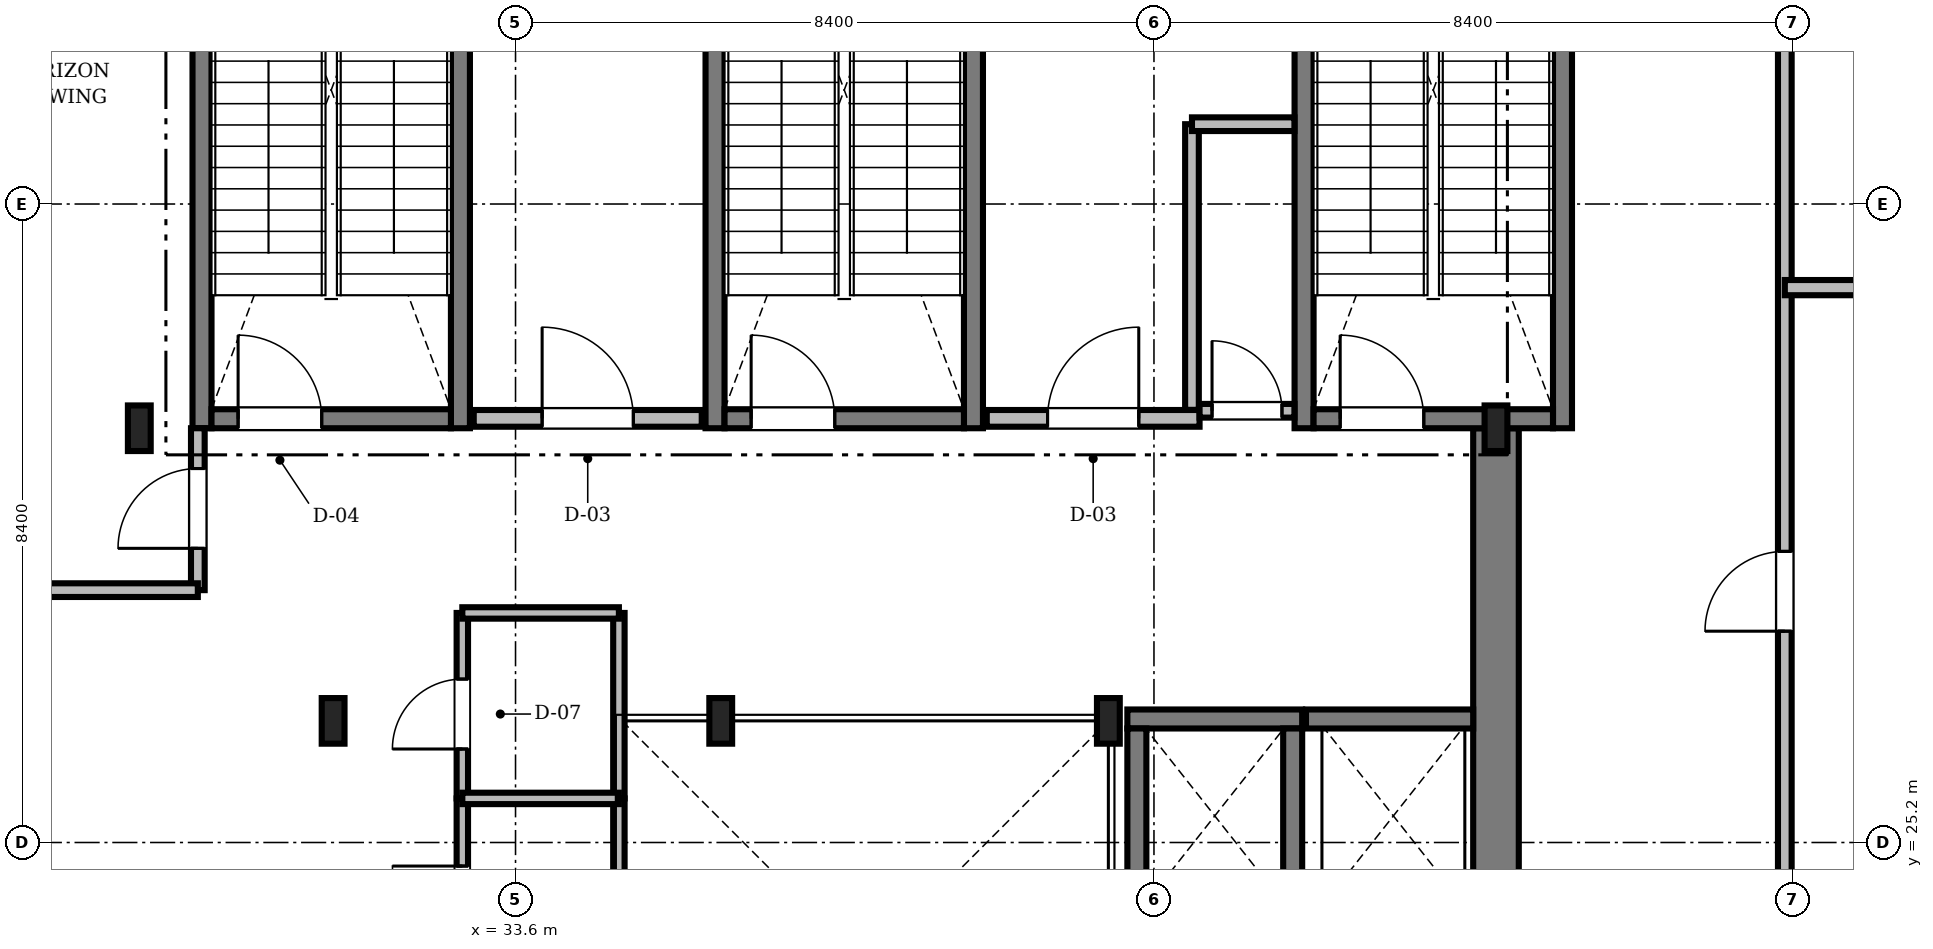
"""IFC4 building model, lengths in metres.
Left out: names, types, materials, properties, quantities, classifications, styles, units other than length and angle.
Written with IfcOpenShell. Run it as: python <this file> out.ifc"""

import sys

from ifc_helpers import new_model, si_unit, direction, frame, frame_2d, origin, origin_2d, place, context, subcontext, project, spatial, rectangle, i_section, extrude, source, transform, mapped, element, fill, save


model = new_model("IFC4")
c1 = context("Model", 3, precision=1e-05, world=origin(), true_north=direction((0.0, 1.0)))
c2 = subcontext(c1, "Body", "Model", "MODEL_VIEW")
j1 = project(units=[si_unit("LENGTHUNIT", "METRE"), si_unit("PLANEANGLEUNIT", "RADIAN")], contexts=[c1])
p1 = place(None, origin())
s1 = spatial("IfcSite", under=j1, at=p1, CompositionType="ELEMENT")
p2 = place(p1, origin())
s2 = spatial("IfcBuilding", under=s1, at=p2, CompositionType="ELEMENT")
p3 = place(p2, frame((0.0, 0.0, 296.15)))
s3 = spatial("IfcBuildingStorey", under=s2, at=p3, CompositionType="ELEMENT", Elevation=296.15)
m1 = source(origin(), c2, "Body", "SweptSolid", [
    extrude(rectangle(XDim=13.15, YDim=0.6, at=frame_2d((6.575, 0.0))), origin(), (0.0, 0.0, 1.0), 4.7),
])
p4 = place(p3, frame((46.5, 17.5, 0.0), z_axis=(0.0, 0.0, 1.0), x_axis=(0.0, 1.0, 0.0)))
e1 = element("IfcWall", 1, at=p4, inside=s3, PredefinedType="SHEAR", context=c2, shape_type="MappedRepresentation", body=[
    mapped(m1, transform((0.0, 0.0, 0.0), scale=1.0)),
])
m2 = source(origin(), c2, "Body", "SweptSolid", [
    extrude(i_section(OverallWidth=0.3, OverallDepth=0.6, WebThickness=0.015, FlangeThickness=0.03, FilletRadius=0.027, at=origin_2d()), origin(), (0.0, 0.0, 1.0), 4.7),
])
for number, where, z_axis, x_axis in (
    (2, (41.4, 26.8, 0.0), (0.0, 0.0, 1.0), (1.0, 0.0, 0.0)),
    (3, (36.3, 26.8, 0.0), (0.0, 0.0, 1.0), (1.0, 0.0, 0.0)),
    (4, (31.2, 26.8, 0.0), (0.0, 0.0, 1.0), (1.0, 0.0, 0.0)),
    (5, (28.65, 30.65, 0.0), (0.0, 0.0, 1.0), (1.0, 0.0, 0.0)),
    (6, (46.5, 30.65, 0.0), (0.0, 0.0, 1.0), (1.0, 0.0, 0.0)),
):
    element("IfcColumn", number, at=place(p3, frame(where, z_axis=z_axis, x_axis=x_axis)), inside=s3, PredefinedType="COLUMN", context=c2, shape_type="MappedRepresentation", body=[
        mapped(m2, transform((0.0, 0.0, 0.0), scale=1.0)),
    ])
m3 = source(origin(), c2, "Body", "SweptSolid", [
    extrude(rectangle(XDim=1.2, YDim=1.2, at=origin_2d()), origin(), (0.0, 0.0, 1.0), 4.738),
])
p5 = place(p3, frame((26.65, 33.732, 0.0), z_axis=(0.113979310359, -0.054052575301, 0.992011610775), x_axis=(0.428490156126, 0.903546449333, 0.0)))
e7 = element("IfcColumn", 7, at=p5, inside=s3, PredefinedType="COLUMN", context=c2, shape_type="MappedRepresentation", body=[
    mapped(m3, transform((0.0, 0.0, 0.0), scale=1.0)),
])
m4 = source(origin(), c2, "Body", "SweptSolid", [
    extrude(rectangle(XDim=9.35, YDim=0.25, at=frame_2d((4.675, 0.0))), origin(), (0.0, 0.0, 1.0), 4.8),
])
for number, where, z_axis, x_axis in (
    (8, (29.475, 30.65, 0.0), (0.0, 0.0, 1.0), (0.0, 1.0, 0.0)),
    (9, (32.875, 30.65, 0.0), (0.0, 0.0, 1.0), (0.0, 1.0, 0.0)),
):
    element("IfcWall", number, at=place(p3, frame(where, z_axis=z_axis, x_axis=x_axis)), inside=s3, PredefinedType="SOLIDWALL", context=c2, shape_type="MappedRepresentation", body=[
        mapped(m4, transform((0.0, 0.0, 0.0), scale=1.0)),
    ])
m5 = source(origin(), c2, "Body", "SweptSolid", [
    extrude(rectangle(XDim=3.15, YDim=0.25, at=frame_2d((1.575, 0.0))), origin(), (0.0, 0.0, 1.0), 4.8),
])
p6 = place(p3, frame((29.6, 30.775, 0.0), z_axis=(0.0, 0.0, 1.0), x_axis=(1.0, 0.0, 0.0)))
e10 = element("IfcWall", 10, at=p6, inside=s3, PredefinedType="SOLIDWALL", context=c2, shape_type="MappedRepresentation", body=[
    mapped(m5, transform((0.0, 0.0, 0.0), scale=1.0)),
])
m6 = source(origin(), c2, "Body", "SweptSolid", [
    extrude(rectangle(XDim=1.1, YDim=2.2, at=frame_2d((0.55, 1.1))), frame((0.0, 0.135, 0.0), z_axis=(0.0, -1.0, 0.0), x_axis=(1.0, 0.0, 0.0)), (0.0, 0.0, 1.0), 0.27),
])
p7 = place(p6, frame((0.35, 0.0, 0.0)))
e11 = element("IfcOpeningElement", 11, at=p7, cuts=e10, PredefinedType="OPENING", context=c2, shape_type="MappedRepresentation", body=[
    mapped(m6, transform((0.0, 0.0, 0.0), scale=1.0)),
])
for number, where, z_axis, x_axis in (
    (12, (36.225, 30.65, 0.0), (0.0, 0.0, 1.0), (0.0, 1.0, 0.0)),
    (13, (39.625, 30.65, 0.0), (0.0, 0.0, 1.0), (0.0, 1.0, 0.0)),
):
    element("IfcWall", number, at=place(p3, frame(where, z_axis=z_axis, x_axis=x_axis)), inside=s3, PredefinedType="SOLIDWALL", context=c2, shape_type="MappedRepresentation", body=[
        mapped(m4, transform((0.0, 0.0, 0.0), scale=1.0)),
    ])
p8 = place(p3, frame((36.35, 30.775, 0.0), z_axis=(0.0, 0.0, 1.0), x_axis=(1.0, 0.0, 0.0)))
e14 = element("IfcWall", 14, at=p8, inside=s3, PredefinedType="SOLIDWALL", context=c2, shape_type="MappedRepresentation", body=[
    mapped(m5, transform((0.0, 0.0, 0.0), scale=1.0)),
])
p9 = place(p8, frame((0.35, 0.0, 0.0)))
e15 = element("IfcOpeningElement", 15, at=p9, cuts=e14, PredefinedType="OPENING", context=c2, shape_type="MappedRepresentation", body=[
    mapped(m6, transform((0.0, 0.0, 0.0), scale=1.0)),
])
for number, where, z_axis, x_axis in (
    (16, (43.975, 30.65, 0.0), (0.0, 0.0, 1.0), (0.0, 1.0, 0.0)),
    (17, (47.375, 30.65, 0.0), (0.0, 0.0, 1.0), (0.0, 1.0, 0.0)),
):
    element("IfcWall", number, at=place(p3, frame(where, z_axis=z_axis, x_axis=x_axis)), inside=s3, PredefinedType="SOLIDWALL", context=c2, shape_type="MappedRepresentation", body=[
        mapped(m4, transform((0.0, 0.0, 0.0), scale=1.0)),
    ])
p10 = place(p3, frame((44.1, 30.775, 0.0), z_axis=(0.0, 0.0, 1.0), x_axis=(1.0, 0.0, 0.0)))
e18 = element("IfcWall", 18, at=p10, inside=s3, PredefinedType="SOLIDWALL", context=c2, shape_type="MappedRepresentation", body=[
    mapped(m5, transform((0.0, 0.0, 0.0), scale=1.0)),
])
p11 = place(p10, frame((0.35, 0.0, 0.0)))
e19 = element("IfcOpeningElement", 19, at=p11, cuts=e18, PredefinedType="OPENING", context=c2, shape_type="MappedRepresentation", body=[
    mapped(m6, transform((0.0, 0.0, 0.0), scale=1.0)),
])
m7 = source(origin(), c2, "Body", "SweptSolid", [
    extrude(rectangle(XDim=3.0, YDim=0.22, at=frame_2d((1.5, 0.0))), origin(), (0.0, 0.0, 1.0), 4.7),
])
p12 = place(p3, frame((33.05, 30.78, 0.0), z_axis=(0.0, 0.0, 1.0), x_axis=(1.0, 0.0, 0.0)))
e20 = element("IfcWall", 20, at=p12, inside=s3, PredefinedType="SOLIDWALL", context=c2, shape_type="MappedRepresentation", body=[
    mapped(m7, transform((0.0, 0.0, 0.0), scale=1.0)),
])
m8 = source(origin(), c2, "Body", "SweptSolid", [
    extrude(rectangle(XDim=1.2, YDim=2.2, at=frame_2d((0.6, 1.1))), frame((0.0, 0.12, 0.0), z_axis=(0.0, -1.0, 0.0), x_axis=(1.0, 0.0, 0.0)), (0.0, 0.0, 1.0), 0.24),
])
p13 = place(p12, frame((0.9, 0.0, 0.0)))
e21 = element("IfcOpeningElement", 21, at=p13, cuts=e20, PredefinedType="OPENING", context=c2, shape_type="MappedRepresentation", body=[
    mapped(m8, transform((0.0, 0.0, 0.0), scale=1.0)),
])
m9 = source(origin(), c2, "Body", "SweptSolid", [
    extrude(rectangle(XDim=2.8, YDim=0.22, at=frame_2d((1.4, 0.0))), origin(), (0.0, 0.0, 1.0), 4.7),
])
p14 = place(p3, frame((39.8, 30.78, 0.0), z_axis=(0.0, 0.0, 1.0), x_axis=(1.0, 0.0, 0.0)))
e22 = element("IfcWall", 22, at=p14, inside=s3, PredefinedType="SOLIDWALL", context=c2, shape_type="MappedRepresentation", body=[
    mapped(m9, transform((0.0, 0.0, 0.0), scale=1.0)),
])
p15 = place(p14, frame((0.8, 0.0, 0.0)))
e23 = element("IfcOpeningElement", 23, at=p15, cuts=e22, PredefinedType="OPENING", context=c2, shape_type="MappedRepresentation", body=[
    mapped(m8, transform((0.0, 0.0, 0.0), scale=1.0)),
])
m10 = source(origin(), c2, "Body", "SweptSolid", [
    extrude(rectangle(XDim=2.3, YDim=0.25, at=frame_2d((1.15, 0.0))), origin(), (0.0, 0.0, 1.0), 4.7),
])
for number, where, z_axis, x_axis in (
    (24, (41.65, 26.825, 0.0), (0.0, 0.0, 1.0), (1.0, 0.0, 0.0)),
    (25, (41.775, 24.4, 0.0), (0.0, 0.0, 1.0), (0.0, 1.0, 0.0)),
    (26, (43.825, 24.4, 0.0), (0.0, 0.0, 1.0), (0.0, 1.0, 0.0)),
):
    element("IfcWall", number, at=place(p3, frame(where, z_axis=z_axis, x_axis=x_axis)), inside=s3, PredefinedType="SOLIDWALL", context=c2, shape_type="MappedRepresentation", body=[
        mapped(m10, transform((0.0, 0.0, 0.0), scale=1.0)),
    ])
m11 = source(origin(), c2, "Body", "SweptSolid", [
    extrude(rectangle(XDim=2.2, YDim=0.25, at=frame_2d((1.1, 0.0))), origin(), (0.0, 0.0, 1.0), 4.7),
])
p16 = place(p3, frame((44.0, 26.825, 0.0), z_axis=(0.0, 0.0, 1.0), x_axis=(1.0, 0.0, 0.0)))
e27 = element("IfcWall", 27, at=p16, inside=s3, PredefinedType="SOLIDWALL", context=c2, shape_type="MappedRepresentation", body=[
    mapped(m11, transform((0.0, 0.0, 0.0), scale=1.0)),
])
m12 = source(origin(), c2, "Body", "SweptSolid", [
    extrude(rectangle(XDim=26.428, YDim=0.18, at=frame_2d((13.214, 0.0))), origin(), (0.0, 0.0, 1.0), 3.942),
])
p17 = place(p3, frame((50.3, 16.45, 0.0), z_axis=(0.0, 0.0, 1.0), x_axis=(0.0, 1.0, 0.0)))
e28 = element("IfcWall", 28, at=p17, inside=s3, PredefinedType="PARTITIONING", context=c2, shape_type="MappedRepresentation", body=[
    mapped(m12, transform((0.0, 0.0, 0.0), scale=1.0)),
])
m13 = source(origin(), c2, "Body", "SweptSolid", [
    extrude(rectangle(XDim=1.05, YDim=2.2, at=frame_2d((0.525, 1.1))), frame((0.0, 0.1, 0.0), z_axis=(0.0, -1.0, 0.0), x_axis=(1.0, 0.0, 0.0)), (0.0, 0.0, 1.0), 0.2),
])
p18 = place(p17, frame((3.53, 0.0, 0.0)))
e29 = element("IfcOpeningElement", 29, at=p18, cuts=e28, PredefinedType="OPENING", context=c2, shape_type="MappedRepresentation", body=[
    mapped(m13, transform((0.0, 0.0, 0.0), scale=1.0)),
])
p19 = place(p17, frame((11.53, 0.0, 0.0)))
e30 = element("IfcOpeningElement", 30, at=p19, cuts=e28, PredefinedType="OPENING", context=c2, shape_type="MappedRepresentation", body=[
    mapped(m13, transform((0.0, 0.0, 0.0), scale=1.0)),
])
p20 = place(p17, frame((20.705, 0.0, 0.0)))
e31 = element("IfcOpeningElement", 31, at=p20, cuts=e28, PredefinedType="OPENING", context=c2, shape_type="MappedRepresentation", body=[
    mapped(m13, transform((0.0, 0.0, 0.0), scale=1.0)),
])
m14 = source(origin(), c2, "Body", "SweptSolid", [
    extrude(rectangle(XDim=2.13, YDim=0.18, at=frame_2d((1.065, 0.0))), origin(), (0.0, 0.0, 1.0), 4.332),
])
p21 = place(p3, frame((29.42, 28.52, 0.0), z_axis=(0.0, 0.0, 1.0), x_axis=(0.0, 1.0, 0.0)))
e32 = element("IfcWall", 32, at=p21, inside=s3, PredefinedType="PARTITIONING", context=c2, shape_type="MappedRepresentation", body=[
    mapped(m14, transform((0.0, 0.0, 0.0), scale=1.0)),
])
p22 = place(p21, frame((0.55, 0.0, 0.0)))
e33 = element("IfcOpeningElement", 33, at=p22, cuts=e32, PredefinedType="OPENING", context=c2, shape_type="MappedRepresentation", body=[
    mapped(m13, transform((0.0, 0.0, 0.0), scale=1.0)),
])
m15 = source(origin(), c2, "Body", "SweptSolid", [
    extrude(rectangle(XDim=2.46, YDim=0.15, at=frame_2d((1.23, 0.0))), origin(), (0.0, 0.0, 1.0), 4.7),
])
p23 = place(p3, frame((32.9, 23.32, 0.0), z_axis=(0.0, 0.0, 1.0), x_axis=(0.0, 1.0, 0.0)))
e34 = element("IfcWall", 34, at=p23, inside=s3, PredefinedType="PARTITIONING", context=c2, shape_type="MappedRepresentation", body=[
    mapped(m15, transform((0.0, 0.0, 0.0), scale=1.0)),
])
m16 = source(origin(), c2, "Body", "SweptSolid", [
    extrude(rectangle(XDim=0.92, YDim=2.1, at=frame_2d((0.46, 1.05))), frame((0.0, 0.085, 0.0), z_axis=(0.0, -1.0, 0.0), x_axis=(1.0, 0.0, 0.0)), (0.0, 0.0, 1.0), 0.17),
])
p24 = place(p23, frame((0.65, 0.0, 0.0)))
e35 = element("IfcOpeningElement", 35, at=p24, cuts=e34, PredefinedType="OPENING", context=c2, shape_type="MappedRepresentation", body=[
    mapped(m16, transform((0.0, 0.0, 0.0), scale=1.0)),
])
m17 = source(origin(), c2, "Body", "SweptSolid", [
    extrude(rectangle(XDim=2.44, YDim=0.15, at=frame_2d((1.22, 0.0))), origin(), (0.0, 0.0, 1.0), 4.242),
])
p25 = place(p3, frame((32.9, 25.78, 0.0), z_axis=(0.0, 0.0, 1.0), x_axis=(0.0, 1.0, 0.0)))
e36 = element("IfcWall", 36, at=p25, inside=s3, PredefinedType="PARTITIONING", context=c2, shape_type="MappedRepresentation", body=[
    mapped(m17, transform((0.0, 0.0, 0.0), scale=1.0)),
])
p26 = place(p25, frame((0.65, 0.0, 0.0)))
e37 = element("IfcOpeningElement", 37, at=p26, cuts=e36, PredefinedType="OPENING", context=c2, shape_type="MappedRepresentation", body=[
    mapped(m16, transform((0.0, 0.0, 0.0), scale=1.0)),
])
m18 = source(origin(), c2, "Body", "SweptSolid", [
    extrude(rectangle(XDim=1.248, YDim=0.18, at=frame_2d((0.624, 0.0))), origin(), (0.0, 0.0, 1.0), 4.7),
])
p27 = place(p3, frame((42.6, 30.88, 0.0), z_axis=(0.0, 0.0, 1.0), x_axis=(1.0, 0.0, 0.0)))
e38 = element("IfcWall", 38, at=p27, inside=s3, PredefinedType="PARTITIONING", context=c2, shape_type="MappedRepresentation", body=[
    mapped(m18, transform((0.0, 0.0, 0.0), scale=1.0)),
])
m19 = source(origin(), c2, "Body", "SweptSolid", [
    extrude(rectangle(XDim=0.92, YDim=2.1, at=frame_2d((0.46, 1.05))), frame((0.0, 0.1, 0.0), z_axis=(0.0, -1.0, 0.0), x_axis=(1.0, 0.0, 0.0)), (0.0, 0.0, 1.0), 0.2),
])
p28 = place(p27, frame((0.164, 0.0, 0.0)))
e39 = element("IfcOpeningElement", 39, at=p28, cuts=e38, PredefinedType="OPENING", context=c2, shape_type="MappedRepresentation", body=[
    mapped(m19, transform((0.0, 0.0, 0.0), scale=1.0)),
])
m20 = source(origin(), c2, "Body", "SweptSolid", [
    extrude(rectangle(XDim=10.878, YDim=0.2, at=frame_2d((5.439, 0.0))), origin(), (0.0, 0.0, 1.0), 3.942),
])
p29 = place(p3, frame((50.3, 32.5, 0.0), z_axis=(0.0, 0.0, 1.0), x_axis=(1.0, 0.0, 0.0)))
e40 = element("IfcWall", 40, at=p29, inside=s3, PredefinedType="PARTITIONING", context=c2, shape_type="MappedRepresentation", body=[
    mapped(m20, transform((0.0, 0.0, 0.0), scale=1.0)),
])
m21 = source(origin(), c2, "Body", "SweptSolid", [
    extrude(rectangle(XDim=3.758, YDim=0.18, at=frame_2d((1.879, 0.0))), origin(), (0.0, 0.0, 1.0), 4.7),
])
p30 = place(p3, frame((42.5, 30.892, 0.0), z_axis=(0.0, 0.0, 1.0), x_axis=(0.0, 1.0, 0.0)))
e41 = element("IfcWall", 41, at=p30, inside=s3, PredefinedType="PARTITIONING", context=c2, shape_type="MappedRepresentation", body=[
    mapped(m21, transform((0.0, 0.0, 0.0), scale=1.0)),
])
m22 = source(origin(), c2, "Body", "SweptSolid", [
    extrude(rectangle(XDim=3.598, YDim=0.18, at=frame_2d((1.799, 0.0))), origin(), (0.0, 0.0, 1.0), 3.942),
])
p31 = place(p3, frame((25.822, 28.52, 0.0), z_axis=(0.0, 0.0, 1.0), x_axis=(1.0, 0.0, 0.0)))
e42 = element("IfcWall", 42, at=p31, inside=s3, PredefinedType="PARTITIONING", context=c2, shape_type="MappedRepresentation", body=[
    mapped(m22, transform((0.0, 0.0, 0.0), scale=1.0)),
])
p32 = place(p3, frame((34.96, 23.32, 0.0), z_axis=(0.0, 0.0, 1.0), x_axis=(0.0, 1.0, 0.0)))
e43 = element("IfcWall", 43, at=p32, inside=s3, PredefinedType="PARTITIONING", context=c2, shape_type="MappedRepresentation", body=[
    mapped(m15, transform((0.0, 0.0, 0.0), scale=1.0)),
])
p33 = place(p3, frame((34.96, 25.78, 0.0), z_axis=(0.0, 0.0, 1.0), x_axis=(0.0, 1.0, 0.0)))
e44 = element("IfcWall", 44, at=p33, inside=s3, PredefinedType="PARTITIONING", context=c2, shape_type="MappedRepresentation", body=[
    mapped(m17, transform((0.0, 0.0, 0.0), scale=1.0)),
])
m23 = source(origin(), c2, "Body", "SweptSolid", [
    extrude(rectangle(XDim=2.06, YDim=0.15, at=frame_2d((1.03, 0.0))), origin(), (0.0, 0.0, 1.0), 4.7),
])
p34 = place(p3, frame((32.9, 25.78, 0.0), z_axis=(0.0, 0.0, 1.0), x_axis=(1.0, 0.0, 0.0)))
e45 = element("IfcWall", 45, at=p34, inside=s3, PredefinedType="PARTITIONING", context=c2, shape_type="MappedRepresentation", body=[
    mapped(m23, transform((0.0, 0.0, 0.0), scale=1.0)),
])
m24 = source(origin(), c2, "Body", "SweptSolid", [
    extrude(rectangle(XDim=2.06, YDim=0.15, at=frame_2d((1.03, 0.0))), origin(), (0.0, 0.0, 1.0), 4.332),
])
p35 = place(p3, frame((32.9, 28.22, 0.0), z_axis=(0.0, 0.0, 1.0), x_axis=(1.0, 0.0, 0.0)))
e46 = element("IfcWall", 46, at=p35, inside=s3, PredefinedType="PARTITIONING", context=c2, shape_type="MappedRepresentation", body=[
    mapped(m24, transform((0.0, 0.0, 0.0), scale=1.0)),
])
m25 = source(origin(), c2, "Body", "SweptSolid", [
    extrude(rectangle(XDim=1.348, YDim=0.18, at=frame_2d((0.674, 0.0))), origin(), (0.0, 0.0, 1.0), 4.7),
])
p36 = place(p3, frame((42.5, 34.65, 0.0), z_axis=(0.0, 0.0, 1.0), x_axis=(1.0, 0.0, 0.0)))
e47 = element("IfcWall", 47, at=p36, inside=s3, PredefinedType="PARTITIONING", context=c2, shape_type="MappedRepresentation", body=[
    mapped(m25, transform((0.0, 0.0, 0.0), scale=1.0)),
])
m26 = source(origin(), c2, "Body", "SweptSolid", [
    extrude(rectangle(XDim=1.1, YDim=2.2, at=frame_2d((0.55, 1.1))), frame((0.0, 0.025, 0.0), z_axis=(0.0, -1.0, 0.0), x_axis=(1.0, 0.0, 0.0)), (0.0, 0.0, 1.0), 0.05),
])
p37 = place(p7, origin())
e48 = element("IfcDoor", 48, at=p37, inside=s3, OperationType="SINGLE_SWING_LEFT", PredefinedType="DOOR", context=c2, shape_type="MappedRepresentation", body=[
    mapped(m26, transform((0.0, 0.0, 0.0), scale=1.0)),
])
fill(e11, e48)
p38 = place(p9, origin())
e49 = element("IfcDoor", 49, at=p38, inside=s3, OperationType="SINGLE_SWING_LEFT", PredefinedType="DOOR", context=c2, shape_type="MappedRepresentation", body=[
    mapped(m26, transform((0.0, 0.0, 0.0), scale=1.0)),
])
fill(e15, e49)
p39 = place(p11, origin())
e50 = element("IfcDoor", 50, at=p39, inside=s3, OperationType="SINGLE_SWING_LEFT", PredefinedType="DOOR", context=c2, shape_type="MappedRepresentation", body=[
    mapped(m26, transform((0.0, 0.0, 0.0), scale=1.0)),
])
fill(e19, e50)
m27 = source(origin(), c2, "Body", "SweptSolid", [
    extrude(rectangle(XDim=1.2, YDim=2.2, at=frame_2d((0.6, 1.1))), frame((0.0, 0.025, 0.0), z_axis=(0.0, -1.0, 0.0), x_axis=(1.0, 0.0, 0.0)), (0.0, 0.0, 1.0), 0.05),
])
p40 = place(p13, origin())
e51 = element("IfcDoor", 51, at=p40, inside=s3, OperationType="SINGLE_SWING_LEFT", PredefinedType="DOOR", context=c2, shape_type="MappedRepresentation", body=[
    mapped(m27, transform((0.0, 0.0, 0.0), scale=1.0)),
])
fill(e21, e51)
p41 = place(p15, origin())
e52 = element("IfcDoor", 52, at=p41, inside=s3, OperationType="SINGLE_SWING_RIGHT", PredefinedType="DOOR", context=c2, shape_type="MappedRepresentation", body=[
    mapped(m27, transform((0.0, 0.0, 0.0), scale=1.0)),
])
fill(e23, e52)
m28 = source(origin(), c2, "Body", "SweptSolid", [
    extrude(rectangle(XDim=1.05, YDim=2.2, at=frame_2d((0.525, 1.1))), frame((0.0, 0.025, 0.0), z_axis=(0.0, -1.0, 0.0), x_axis=(1.0, 0.0, 0.0)), (0.0, 0.0, 1.0), 0.05),
])
p42 = place(p19, origin())
e53 = element("IfcDoor", 53, at=p42, inside=s3, OperationType="SINGLE_SWING_LEFT", PredefinedType="DOOR", context=c2, shape_type="MappedRepresentation", body=[
    mapped(m28, transform((0.0, 0.0, 0.0), scale=1.0)),
])
fill(e30, e53)
p43 = place(p22, origin())
e54 = element("IfcDoor", 54, at=p43, inside=s3, OperationType="SINGLE_SWING_LEFT", PredefinedType="DOOR", context=c2, shape_type="MappedRepresentation", body=[
    mapped(m28, transform((0.0, 0.0, 0.0), scale=1.0)),
])
fill(e33, e54)
m29 = source(origin(), c2, "Body", "SweptSolid", [
    extrude(rectangle(XDim=0.92, YDim=2.1, at=frame_2d((0.46, 1.05))), frame((0.0, 0.025, 0.0), z_axis=(0.0, -1.0, 0.0), x_axis=(1.0, 0.0, 0.0)), (0.0, 0.0, 1.0), 0.05),
])
p44 = place(p24, origin())
e55 = element("IfcDoor", 55, at=p44, inside=s3, OperationType="SINGLE_SWING_RIGHT", PredefinedType="DOOR", context=c2, shape_type="MappedRepresentation", body=[
    mapped(m29, transform((0.0, 0.0, 0.0), scale=1.0)),
])
fill(e35, e55)
p45 = place(p26, origin())
e56 = element("IfcDoor", 56, at=p45, inside=s3, OperationType="SINGLE_SWING_LEFT", PredefinedType="DOOR", context=c2, shape_type="MappedRepresentation", body=[
    mapped(m29, transform((0.0, 0.0, 0.0), scale=1.0)),
])
fill(e37, e56)
p46 = place(p28, origin())
e57 = element("IfcDoor", 57, at=p46, inside=s3, OperationType="SINGLE_SWING_LEFT", PredefinedType="DOOR", context=c2, shape_type="MappedRepresentation", body=[
    mapped(m29, transform((0.0, 0.0, 0.0), scale=1.0)),
])
fill(e39, e57)
save(model, sys.argv[1])
